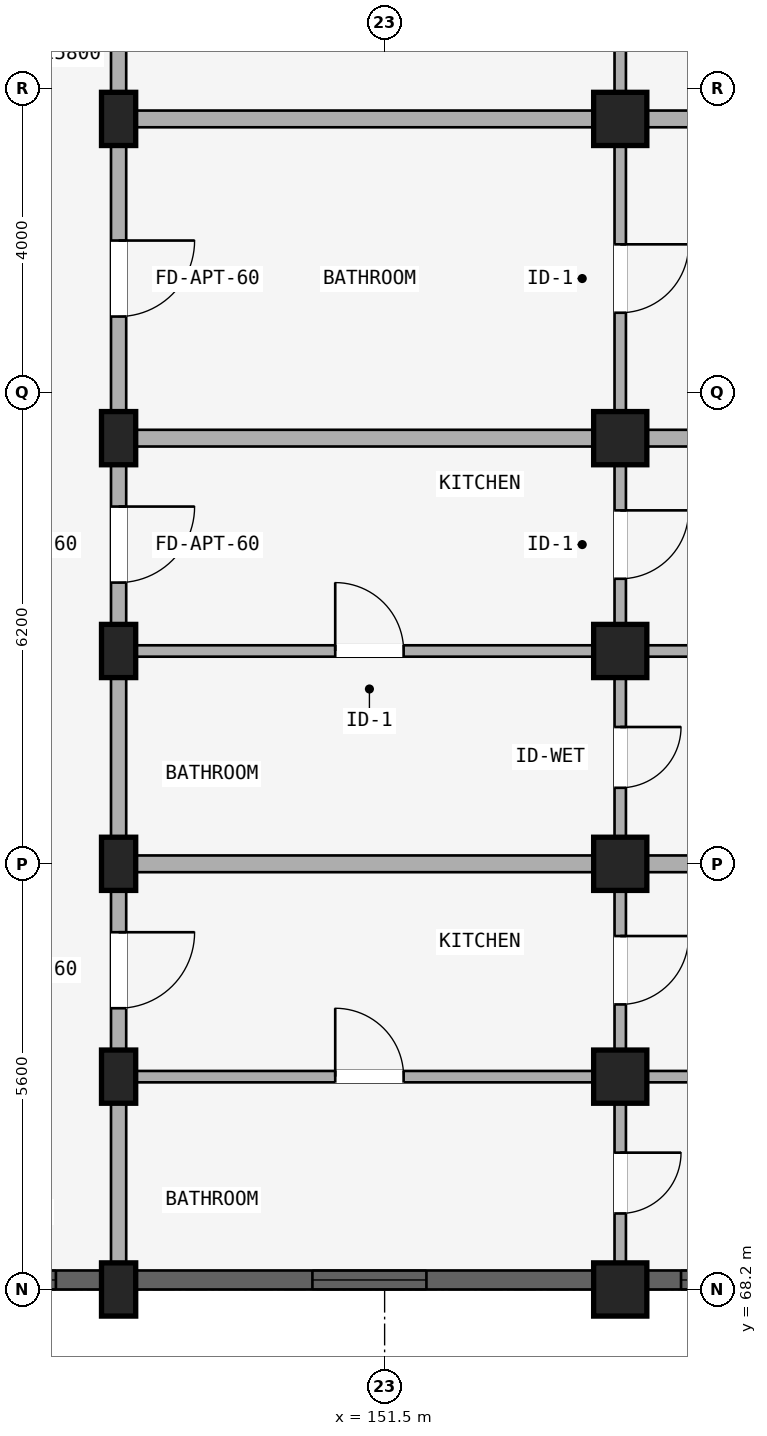
"""IFC4 building model, lengths in metres.
Left out: names, types, materials, properties, quantities, classifications, styles, units other than length and angle.
Written with IfcOpenShell. Run it as: python <this file> out.ifc"""

import sys

from ifc_helpers import new_model, si_unit, direction, frame, frame_2d, origin, origin_2d, place, context, subcontext, project, spatial, rectangle, extrude, element, fill, save


model = new_model("IFC4")
c1 = context("Model", 3, precision=1e-05, world=origin(), true_north=direction((0.0, 1.0)))
c2 = subcontext(c1, "Body", "Model", "MODEL_VIEW")
j1 = project(units=[si_unit("LENGTHUNIT", "METRE"), si_unit("PLANEANGLEUNIT", "RADIAN")], contexts=[c1])
p1 = place(None, origin())
s1 = spatial("IfcSite", under=j1, at=p1, CompositionType="ELEMENT")
p2 = place(p1, origin())
s2 = spatial("IfcBuilding", under=s1, at=p2, CompositionType="ELEMENT")
p3 = place(p2, frame((0.0, 0.0, 18.15)))
s3 = spatial("IfcBuildingStorey", under=s2, at=p3, CompositionType="ELEMENT", Elevation=18.15)
p4 = place(p3, frame((148.0, 83.6, 0.0), z_axis=(0.0, 0.0, 1.0), x_axis=(1.0, 0.0, 0.0)))
e1 = element("IfcColumn", 1, at=p4, inside=s3, PredefinedType="COLUMN", context=c2, shape_type="SweptSolid", body=[
    extrude(rectangle(XDim=0.45, YDim=0.7, at=origin_2d()), origin(), (0.0, 0.0, 1.0), 2.93),
])
p5 = place(p3, frame((154.6, 83.6, 0.0), z_axis=(0.0, 0.0, 1.0), x_axis=(1.0, 0.0, 0.0)))
e2 = element("IfcColumn", 2, at=p5, inside=s3, PredefinedType="COLUMN", context=c2, shape_type="SweptSolid", body=[
    extrude(rectangle(XDim=0.7, YDim=0.7, at=origin_2d()), origin(), (0.0, 0.0, 1.0), 2.93),
])
p6 = place(p3, frame((148.0, 79.4, 0.0), z_axis=(0.0, 0.0, 1.0), x_axis=(1.0, 0.0, 0.0)))
e3 = element("IfcColumn", 3, at=p6, inside=s3, PredefinedType="COLUMN", context=c2, shape_type="SweptSolid", body=[
    extrude(rectangle(XDim=0.45, YDim=0.7, at=origin_2d()), origin(), (0.0, 0.0, 1.0), 2.93),
])
p7 = place(p3, frame((154.6, 79.4, 0.0), z_axis=(0.0, 0.0, 1.0), x_axis=(1.0, 0.0, 0.0)))
e4 = element("IfcColumn", 4, at=p7, inside=s3, PredefinedType="COLUMN", context=c2, shape_type="SweptSolid", body=[
    extrude(rectangle(XDim=0.7, YDim=0.7, at=origin_2d()), origin(), (0.0, 0.0, 1.0), 2.93),
])
p8 = place(p3, frame((148.0, 76.6, 0.0), z_axis=(0.0, 0.0, 1.0), x_axis=(1.0, 0.0, 0.0)))
e5 = element("IfcColumn", 5, at=p8, inside=s3, PredefinedType="COLUMN", context=c2, shape_type="SweptSolid", body=[
    extrude(rectangle(XDim=0.45, YDim=0.7, at=origin_2d()), origin(), (0.0, 0.0, 1.0), 2.93),
])
p9 = place(p3, frame((154.6, 76.6, 0.0), z_axis=(0.0, 0.0, 1.0), x_axis=(1.0, 0.0, 0.0)))
e6 = element("IfcColumn", 6, at=p9, inside=s3, PredefinedType="COLUMN", context=c2, shape_type="SweptSolid", body=[
    extrude(rectangle(XDim=0.7, YDim=0.7, at=origin_2d()), origin(), (0.0, 0.0, 1.0), 2.93),
])
p10 = place(p3, frame((148.0, 73.8, 0.0), z_axis=(0.0, 0.0, 1.0), x_axis=(1.0, 0.0, 0.0)))
e7 = element("IfcColumn", 7, at=p10, inside=s3, PredefinedType="COLUMN", context=c2, shape_type="SweptSolid", body=[
    extrude(rectangle(XDim=0.45, YDim=0.7, at=origin_2d()), origin(), (0.0, 0.0, 1.0), 2.93),
])
p11 = place(p3, frame((154.6, 73.8, 0.0), z_axis=(0.0, 0.0, 1.0), x_axis=(1.0, 0.0, 0.0)))
e8 = element("IfcColumn", 8, at=p11, inside=s3, PredefinedType="COLUMN", context=c2, shape_type="SweptSolid", body=[
    extrude(rectangle(XDim=0.7, YDim=0.7, at=origin_2d()), origin(), (0.0, 0.0, 1.0), 2.93),
])
p12 = place(p3, frame((148.0, 71.0, 0.0), z_axis=(0.0, 0.0, 1.0), x_axis=(1.0, 0.0, 0.0)))
e9 = element("IfcColumn", 9, at=p12, inside=s3, PredefinedType="COLUMN", context=c2, shape_type="SweptSolid", body=[
    extrude(rectangle(XDim=0.45, YDim=0.7, at=origin_2d()), origin(), (0.0, 0.0, 1.0), 2.93),
])
p13 = place(p3, frame((154.6, 71.0, 0.0), z_axis=(0.0, 0.0, 1.0), x_axis=(1.0, 0.0, 0.0)))
e10 = element("IfcColumn", 10, at=p13, inside=s3, PredefinedType="COLUMN", context=c2, shape_type="SweptSolid", body=[
    extrude(rectangle(XDim=0.7, YDim=0.7, at=origin_2d()), origin(), (0.0, 0.0, 1.0), 2.93),
])
p14 = place(p3, frame((148.0, 68.2, 0.0), z_axis=(0.0, 0.0, 1.0), x_axis=(1.0, 0.0, 0.0)))
e11 = element("IfcColumn", 11, at=p14, inside=s3, PredefinedType="COLUMN", context=c2, shape_type="SweptSolid", body=[
    extrude(rectangle(XDim=0.45, YDim=0.7, at=origin_2d()), origin(), (0.0, 0.0, 1.0), 2.93),
])
p15 = place(p3, frame((154.6, 68.2, 0.0), z_axis=(0.0, 0.0, 1.0), x_axis=(1.0, 0.0, 0.0)))
e12 = element("IfcColumn", 12, at=p15, inside=s3, PredefinedType="COLUMN", context=c2, shape_type="SweptSolid", body=[
    extrude(rectangle(XDim=0.7, YDim=0.7, at=origin_2d()), origin(), (0.0, 0.0, 1.0), 2.93),
])
p16 = place(p3, frame((148.0, 87.65, 0.0), z_axis=(0.0, 0.0, 1.0), x_axis=(0.0, -1.0, 0.0)))
e13 = element("IfcWall", 13, at=p16, inside=s3, PredefinedType="STANDARD", context=c2, shape_type="SweptSolid", body=[
    extrude(rectangle(XDim=4.05, YDim=0.2, at=frame_2d((2.025, 0.0))), origin(), (0.0, 0.0, 1.0), 2.372),
])
p17 = place(p16, frame((1.525, 0.0, 0.0)))
e14 = element("IfcOpeningElement", 14, at=p17, cuts=e13, PredefinedType="OPENING", context=c2, shape_type="SweptSolid", body=[
    extrude(rectangle(XDim=1.0, YDim=2.15, at=frame_2d((0.5, 1.075))), frame((0.0, 0.11, 0.0), z_axis=(0.0, -1.0, 0.0), x_axis=(1.0, 0.0, 0.0)), (0.0, 0.0, 1.0), 0.22),
])
p18 = place(p3, frame((154.6, 87.57, 0.0), z_axis=(0.0, 0.0, 1.0), x_axis=(0.0, -1.0, 0.0)))
e15 = element("IfcWall", 15, at=p18, inside=s3, PredefinedType="PARTITIONING", context=c2, shape_type="SweptSolid", body=[
    extrude(rectangle(XDim=3.89, YDim=0.15, at=frame_2d((1.945, 0.0))), origin(), (0.0, 0.0, 1.0), 2.372),
])
p19 = place(p18, frame((1.495, 0.0, 0.0)))
e16 = element("IfcOpeningElement", 16, at=p19, cuts=e15, PredefinedType="OPENING", context=c2, shape_type="SweptSolid", body=[
    extrude(rectangle(XDim=0.9, YDim=2.1, at=frame_2d((0.45, 1.05))), frame((0.0, 0.085, 0.0), z_axis=(0.0, -1.0, 0.0), x_axis=(1.0, 0.0, 0.0)), (0.0, 0.0, 1.0), 0.17),
])
p20 = place(p3, frame((148.0, 83.6, 0.0), z_axis=(0.0, 0.0, 1.0), x_axis=(0.0, -1.0, 0.0)))
e17 = element("IfcWall", 17, at=p20, inside=s3, PredefinedType="STANDARD", context=c2, shape_type="SweptSolid", body=[
    extrude(rectangle(XDim=4.2, YDim=0.2, at=frame_2d((2.1, 0.0))), origin(), (0.0, 0.0, 1.0), 2.372),
])
p21 = place(p20, frame((1.6, 0.0, 0.0)))
e18 = element("IfcOpeningElement", 18, at=p21, cuts=e17, PredefinedType="OPENING", context=c2, shape_type="SweptSolid", body=[
    extrude(rectangle(XDim=1.0, YDim=2.15, at=frame_2d((0.5, 1.075))), frame((0.0, 0.11, 0.0), z_axis=(0.0, -1.0, 0.0), x_axis=(1.0, 0.0, 0.0)), (0.0, 0.0, 1.0), 0.22),
])
p22 = place(p3, frame((154.6, 83.52, 0.0), z_axis=(0.0, 0.0, 1.0), x_axis=(0.0, -1.0, 0.0)))
e19 = element("IfcWall", 19, at=p22, inside=s3, PredefinedType="PARTITIONING", context=c2, shape_type="SweptSolid", body=[
    extrude(rectangle(XDim=4.04, YDim=0.15, at=frame_2d((2.02, 0.0))), origin(), (0.0, 0.0, 1.0), 2.372),
])
p23 = place(p22, frame((1.57, 0.0, 0.0)))
e20 = element("IfcOpeningElement", 20, at=p23, cuts=e19, PredefinedType="OPENING", context=c2, shape_type="SweptSolid", body=[
    extrude(rectangle(XDim=0.9, YDim=2.1, at=frame_2d((0.45, 1.05))), frame((0.0, 0.085, 0.0), z_axis=(0.0, -1.0, 0.0), x_axis=(1.0, 0.0, 0.0)), (0.0, 0.0, 1.0), 0.17),
])
p24 = place(p3, frame((148.05, 83.6, 0.0), z_axis=(0.0, 0.0, 1.0), x_axis=(1.0, 0.0, 0.0)))
e21 = element("IfcWall", 21, at=p24, inside=s3, PredefinedType="STANDARD", context=c2, shape_type="SweptSolid", body=[
    extrude(rectangle(XDim=17.53, YDim=0.22, at=frame_2d((8.765, 0.0))), origin(), (0.0, 0.0, 1.0), 2.372),
])
p25 = place(p3, frame((148.0, 79.4, 0.0), z_axis=(0.0, 0.0, 1.0), x_axis=(0.0, -1.0, 0.0)))
e22 = element("IfcWall", 22, at=p25, inside=s3, PredefinedType="STANDARD", context=c2, shape_type="SweptSolid", body=[
    extrude(rectangle(XDim=2.8, YDim=0.2, at=frame_2d((1.4, 0.0))), origin(), (0.0, 0.0, 1.0), 2.372),
])
p26 = place(p25, frame((0.9, 0.0, 0.0)))
e23 = element("IfcOpeningElement", 23, at=p26, cuts=e22, PredefinedType="OPENING", context=c2, shape_type="SweptSolid", body=[
    extrude(rectangle(XDim=1.0, YDim=2.15, at=frame_2d((0.5, 1.075))), frame((0.0, 0.11, 0.0), z_axis=(0.0, -1.0, 0.0), x_axis=(1.0, 0.0, 0.0)), (0.0, 0.0, 1.0), 0.22),
])
p27 = place(p3, frame((154.6, 79.32, 0.0), z_axis=(0.0, 0.0, 1.0), x_axis=(0.0, -1.0, 0.0)))
e24 = element("IfcWall", 24, at=p27, inside=s3, PredefinedType="PLUMBINGWALL", context=c2, shape_type="SweptSolid", body=[
    extrude(rectangle(XDim=2.64, YDim=0.15, at=frame_2d((1.32, 0.0))), origin(), (0.0, 0.0, 1.0), 2.372),
])
p28 = place(p27, frame((0.87, 0.0, 0.0)))
e25 = element("IfcOpeningElement", 25, at=p28, cuts=e24, PredefinedType="OPENING", context=c2, shape_type="SweptSolid", body=[
    extrude(rectangle(XDim=0.9, YDim=2.1, at=frame_2d((0.45, 1.05))), frame((0.0, 0.085, 0.0), z_axis=(0.0, -1.0, 0.0), x_axis=(1.0, 0.0, 0.0)), (0.0, 0.0, 1.0), 0.17),
])
p29 = place(p3, frame((148.1, 79.4, 0.0), z_axis=(0.0, 0.0, 1.0), x_axis=(1.0, 0.0, 0.0)))
e26 = element("IfcWall", 26, at=p29, inside=s3, PredefinedType="STANDARD", context=c2, shape_type="SweptSolid", body=[
    extrude(rectangle(XDim=17.42, YDim=0.22, at=frame_2d((8.71, 0.0))), origin(), (0.0, 0.0, 1.0), 2.372),
])
p30 = place(p3, frame((148.0, 76.6, 0.0), z_axis=(0.0, 0.0, 1.0), x_axis=(0.0, -1.0, 0.0)))
e27 = element("IfcWall", 27, at=p30, inside=s3, PredefinedType="STANDARD", context=c2, shape_type="SweptSolid", body=[
    extrude(rectangle(XDim=2.8, YDim=0.2, at=frame_2d((1.4, 0.0))), origin(), (0.0, 0.0, 1.0), 2.372),
])
p31 = place(p3, frame((154.6, 76.52, 0.0), z_axis=(0.0, 0.0, 1.0), x_axis=(0.0, -1.0, 0.0)))
e28 = element("IfcWall", 28, at=p31, inside=s3, PredefinedType="PLUMBINGWALL", context=c2, shape_type="SweptSolid", body=[
    extrude(rectangle(XDim=2.64, YDim=0.15, at=frame_2d((1.32, 0.0))), origin(), (0.0, 0.0, 1.0), 2.372),
])
p32 = place(p31, frame((0.92, 0.0, 0.0)))
e29 = element("IfcOpeningElement", 29, at=p32, cuts=e28, PredefinedType="OPENING", context=c2, shape_type="SweptSolid", body=[
    extrude(rectangle(XDim=0.8, YDim=2.1, at=frame_2d((0.4, 1.05))), frame((0.0, 0.085, 0.0), z_axis=(0.0, -1.0, 0.0), x_axis=(1.0, 0.0, 0.0)), (0.0, 0.0, 1.0), 0.17),
])
p33 = place(p3, frame((148.1, 76.6, 0.0), z_axis=(0.0, 0.0, 1.0), x_axis=(1.0, 0.0, 0.0)))
e30 = element("IfcWall", 30, at=p33, inside=s3, PredefinedType="PARTITIONING", context=c2, shape_type="SweptSolid", body=[
    extrude(rectangle(XDim=17.42, YDim=0.15, at=frame_2d((8.71, 0.0))), origin(), (0.0, 0.0, 1.0), 2.372),
])
p34 = place(p33, frame((2.75, 0.0, 0.0)))
e31 = element("IfcOpeningElement", 31, at=p34, cuts=e30, PredefinedType="OPENING", context=c2, shape_type="SweptSolid", body=[
    extrude(rectangle(XDim=0.9, YDim=2.1, at=frame_2d((0.45, 1.05))), frame((0.0, 0.085, 0.0), z_axis=(0.0, -1.0, 0.0), x_axis=(1.0, 0.0, 0.0)), (0.0, 0.0, 1.0), 0.17),
])
p35 = place(p3, frame((148.0, 73.8, 0.0), z_axis=(0.0, 0.0, 1.0), x_axis=(0.0, -1.0, 0.0)))
e32 = element("IfcWall", 32, at=p35, inside=s3, PredefinedType="STANDARD", context=c2, shape_type="SweptSolid", body=[
    extrude(rectangle(XDim=2.8, YDim=0.2, at=frame_2d((1.4, 0.0))), origin(), (0.0, 0.0, 1.0), 2.372),
])
p36 = place(p35, frame((0.9, 0.0, 0.0)))
e33 = element("IfcOpeningElement", 33, at=p36, cuts=e32, PredefinedType="OPENING", context=c2, shape_type="SweptSolid", body=[
    extrude(rectangle(XDim=1.0, YDim=2.15, at=frame_2d((0.5, 1.075))), frame((0.0, 0.11, 0.0), z_axis=(0.0, -1.0, 0.0), x_axis=(1.0, 0.0, 0.0)), (0.0, 0.0, 1.0), 0.22),
])
p37 = place(p3, frame((154.6, 73.72, 0.0), z_axis=(0.0, 0.0, 1.0), x_axis=(0.0, -1.0, 0.0)))
e34 = element("IfcWall", 34, at=p37, inside=s3, PredefinedType="PLUMBINGWALL", context=c2, shape_type="SweptSolid", body=[
    extrude(rectangle(XDim=2.64, YDim=0.15, at=frame_2d((1.32, 0.0))), origin(), (0.0, 0.0, 1.0), 2.372),
])
p38 = place(p37, frame((0.87, 0.0, 0.0)))
e35 = element("IfcOpeningElement", 35, at=p38, cuts=e34, PredefinedType="OPENING", context=c2, shape_type="SweptSolid", body=[
    extrude(rectangle(XDim=0.9, YDim=2.1, at=frame_2d((0.45, 1.05))), frame((0.0, 0.085, 0.0), z_axis=(0.0, -1.0, 0.0), x_axis=(1.0, 0.0, 0.0)), (0.0, 0.0, 1.0), 0.17),
])
p39 = place(p3, frame((148.1, 73.8, 0.0), z_axis=(0.0, 0.0, 1.0), x_axis=(1.0, 0.0, 0.0)))
e36 = element("IfcWall", 36, at=p39, inside=s3, PredefinedType="STANDARD", context=c2, shape_type="SweptSolid", body=[
    extrude(rectangle(XDim=17.42, YDim=0.22, at=frame_2d((8.71, 0.0))), origin(), (0.0, 0.0, 1.0), 2.372),
])
p40 = place(p3, frame((148.0, 71.0, 0.0), z_axis=(0.0, 0.0, 1.0), x_axis=(0.0, -1.0, 0.0)))
e37 = element("IfcWall", 37, at=p40, inside=s3, PredefinedType="STANDARD", context=c2, shape_type="SweptSolid", body=[
    extrude(rectangle(XDim=2.8, YDim=0.2, at=frame_2d((1.4, 0.0))), origin(), (0.0, 0.0, 1.0), 2.372),
])
p41 = place(p3, frame((154.6, 70.92, 0.0), z_axis=(0.0, 0.0, 1.0), x_axis=(0.0, -1.0, 0.0)))
e38 = element("IfcWall", 38, at=p41, inside=s3, PredefinedType="PLUMBINGWALL", context=c2, shape_type="SweptSolid", body=[
    extrude(rectangle(XDim=2.64, YDim=0.15, at=frame_2d((1.32, 0.0))), origin(), (0.0, 0.0, 1.0), 2.372),
])
p42 = place(p41, frame((0.92, 0.0, 0.0)))
e39 = element("IfcOpeningElement", 39, at=p42, cuts=e38, PredefinedType="OPENING", context=c2, shape_type="SweptSolid", body=[
    extrude(rectangle(XDim=0.8, YDim=2.1, at=frame_2d((0.4, 1.05))), frame((0.0, 0.085, 0.0), z_axis=(0.0, -1.0, 0.0), x_axis=(1.0, 0.0, 0.0)), (0.0, 0.0, 1.0), 0.17),
])
p43 = place(p3, frame((148.1, 71.0, 0.0), z_axis=(0.0, 0.0, 1.0), x_axis=(1.0, 0.0, 0.0)))
e40 = element("IfcWall", 40, at=p43, inside=s3, PredefinedType="PARTITIONING", context=c2, shape_type="SweptSolid", body=[
    extrude(rectangle(XDim=17.42, YDim=0.15, at=frame_2d((8.71, 0.0))), origin(), (0.0, 0.0, 1.0), 2.372),
])
p44 = place(p43, frame((2.75, 0.0, 0.0)))
e41 = element("IfcOpeningElement", 41, at=p44, cuts=e40, PredefinedType="OPENING", context=c2, shape_type="SweptSolid", body=[
    extrude(rectangle(XDim=0.9, YDim=2.1, at=frame_2d((0.45, 1.05))), frame((0.0, 0.085, 0.0), z_axis=(0.0, -1.0, 0.0), x_axis=(1.0, 0.0, 0.0)), (0.0, 0.0, 1.0), 0.17),
])
p45 = place(p3, frame((145.829, 68.325, 0.0), z_axis=(0.0, 0.0, 1.0), x_axis=(1.0, 0.0, 0.0)))
e42 = element("IfcWall", 42, at=p45, inside=s3, PredefinedType="STANDARD", context=c2, shape_type="SweptSolid", body=[
    extrude(rectangle(XDim=1.943, YDim=0.25, at=frame_2d((0.971, 0.0))), origin(), (0.0, 0.0, 1.0), 2.372),
])
p46 = place(p45, frame((0.596, 0.0, 0.88)))
e43 = element("IfcOpeningElement", 43, at=p46, cuts=e42, PredefinedType="OPENING", context=c2, shape_type="SweptSolid", body=[
    extrude(rectangle(XDim=0.75, YDim=1.05, at=frame_2d((0.375, 0.525))), frame((0.0, 0.135, 0.0), z_axis=(0.0, -1.0, 0.0), x_axis=(1.0, 0.0, 0.0)), (0.0, 0.0, 1.0), 0.27),
])
p47 = place(p3, frame((148.229, 68.325, 0.0), z_axis=(0.0, 0.0, 1.0), x_axis=(1.0, 0.0, 0.0)))
e44 = element("IfcWall", 44, at=p47, inside=s3, PredefinedType="STANDARD", context=c2, shape_type="SweptSolid", body=[
    extrude(rectangle(XDim=6.018, YDim=0.25, at=frame_2d((3.009, 0.0))), origin(), (0.0, 0.0, 1.0), 2.372),
])
p48 = place(p47, frame((2.322, 0.0, 0.522)))
e45 = element("IfcOpeningElement", 45, at=p48, cuts=e44, PredefinedType="OPENING", context=c2, shape_type="SweptSolid", body=[
    extrude(rectangle(XDim=1.5, YDim=1.65, at=frame_2d((0.75, 0.825))), frame((0.0, 0.135, 0.0), z_axis=(0.0, -1.0, 0.0), x_axis=(1.0, 0.0, 0.0)), (0.0, 0.0, 1.0), 0.27),
])
p49 = place(p3, frame((154.954, 68.325, 0.0), z_axis=(0.0, 0.0, 1.0), x_axis=(1.0, 0.0, 0.0)))
e46 = element("IfcWall", 46, at=p49, inside=s3, PredefinedType="STANDARD", context=c2, shape_type="SweptSolid", body=[
    extrude(rectangle(XDim=2.093, YDim=0.25, at=frame_2d((1.046, 0.0))), origin(), (0.0, 0.0, 1.0), 2.372),
])
p50 = place(p49, frame((0.447, 0.0, 0.672)))
e47 = element("IfcOpeningElement", 47, at=p50, cuts=e46, PredefinedType="OPENING", context=c2, shape_type="SweptSolid", body=[
    extrude(rectangle(XDim=1.2, YDim=1.5, at=frame_2d((0.6, 0.75))), frame((0.0, 0.135, 0.0), z_axis=(0.0, -1.0, 0.0), x_axis=(1.0, 0.0, 0.0)), (0.0, 0.0, 1.0), 0.27),
])
p51 = place(p46, origin())
e48 = element("IfcWindow", 48, at=p51, inside=s3, PartitioningType="SINGLE_PANEL", PredefinedType="WINDOW", context=c2, shape_type="SweptSolid", body=[
    extrude(rectangle(XDim=0.75, YDim=1.05, at=frame_2d((0.375, 0.525))), frame((0.0, 0.03, 0.0), z_axis=(0.0, -1.0, 0.0), x_axis=(1.0, 0.0, 0.0)), (0.0, 0.0, 1.0), 0.06),
])
fill(e43, e48)
p52 = place(p48, origin())
e49 = element("IfcWindow", 49, at=p52, inside=s3, PartitioningType="DOUBLE_PANEL_VERTICAL", PredefinedType="WINDOW", context=c2, shape_type="SweptSolid", body=[
    extrude(rectangle(XDim=1.5, YDim=1.65, at=frame_2d((0.75, 0.825))), frame((0.0, 0.03, 0.0), z_axis=(0.0, -1.0, 0.0), x_axis=(1.0, 0.0, 0.0)), (0.0, 0.0, 1.0), 0.06),
])
fill(e45, e49)
p53 = place(p50, origin())
e50 = element("IfcWindow", 50, at=p53, inside=s3, PartitioningType="SINGLE_PANEL", PredefinedType="WINDOW", context=c2, shape_type="SweptSolid", body=[
    extrude(rectangle(XDim=1.2, YDim=1.5, at=frame_2d((0.6, 0.75))), frame((0.0, 0.03, 0.0), z_axis=(0.0, -1.0, 0.0), x_axis=(1.0, 0.0, 0.0)), (0.0, 0.0, 1.0), 0.06),
])
fill(e47, e50)
p54 = place(p21, frame((1.0, 0.0, 0.0), z_axis=(0.0, 0.0, 1.0), x_axis=(-1.0, 0.0, 0.0)))
e51 = element("IfcDoor", 51, at=p54, inside=s3, OperationType="SINGLE_SWING_RIGHT", PredefinedType="DOOR", context=c2, shape_type="SweptSolid", body=[
    extrude(rectangle(XDim=1.0, YDim=2.15, at=frame_2d((0.5, 1.075))), frame((0.0, 0.025, 0.0), z_axis=(0.0, -1.0, 0.0), x_axis=(1.0, 0.0, 0.0)), (0.0, 0.0, 1.0), 0.05),
])
fill(e18, e51)
p55 = place(p23, origin())
e52 = element("IfcDoor", 52, at=p55, inside=s3, OperationType="SINGLE_SWING_LEFT", PredefinedType="DOOR", context=c2, shape_type="SweptSolid", body=[
    extrude(rectangle(XDim=0.9, YDim=2.1, at=frame_2d((0.45, 1.05))), frame((0.0, 0.025, 0.0), z_axis=(0.0, -1.0, 0.0), x_axis=(1.0, 0.0, 0.0)), (0.0, 0.0, 1.0), 0.05),
])
fill(e20, e52)
p56 = place(p28, origin())
e53 = element("IfcDoor", 53, at=p56, inside=s3, OperationType="SINGLE_SWING_LEFT", PredefinedType="DOOR", context=c2, shape_type="SweptSolid", body=[
    extrude(rectangle(XDim=0.9, YDim=2.1, at=frame_2d((0.45, 1.05))), frame((0.0, 0.025, 0.0), z_axis=(0.0, -1.0, 0.0), x_axis=(1.0, 0.0, 0.0)), (0.0, 0.0, 1.0), 0.05),
])
fill(e25, e53)
p57 = place(p26, frame((1.0, 0.0, 0.0), z_axis=(0.0, 0.0, 1.0), x_axis=(-1.0, 0.0, 0.0)))
e54 = element("IfcDoor", 54, at=p57, inside=s3, OperationType="SINGLE_SWING_RIGHT", PredefinedType="DOOR", context=c2, shape_type="SweptSolid", body=[
    extrude(rectangle(XDim=1.0, YDim=2.15, at=frame_2d((0.5, 1.075))), frame((0.0, 0.025, 0.0), z_axis=(0.0, -1.0, 0.0), x_axis=(1.0, 0.0, 0.0)), (0.0, 0.0, 1.0), 0.05),
])
fill(e23, e54)
p58 = place(p32, origin())
e55 = element("IfcDoor", 55, at=p58, inside=s3, OperationType="SINGLE_SWING_LEFT", PredefinedType="DOOR", context=c2, shape_type="SweptSolid", body=[
    extrude(rectangle(XDim=0.8, YDim=2.1, at=frame_2d((0.4, 1.05))), frame((0.0, 0.025, 0.0), z_axis=(0.0, -1.0, 0.0), x_axis=(1.0, 0.0, 0.0)), (0.0, 0.0, 1.0), 0.05),
])
fill(e29, e55)
p59 = place(p34, origin())
e56 = element("IfcDoor", 56, at=p59, inside=s3, OperationType="SINGLE_SWING_LEFT", PredefinedType="DOOR", context=c2, shape_type="SweptSolid", body=[
    extrude(rectangle(XDim=0.9, YDim=2.1, at=frame_2d((0.45, 1.05))), frame((0.0, 0.025, 0.0), z_axis=(0.0, -1.0, 0.0), x_axis=(1.0, 0.0, 0.0)), (0.0, 0.0, 1.0), 0.05),
])
fill(e31, e56)
p60 = place(p38, origin())
e57 = element("IfcDoor", 57, at=p60, inside=s3, OperationType="SINGLE_SWING_LEFT", PredefinedType="DOOR", context=c2, shape_type="SweptSolid", body=[
    extrude(rectangle(XDim=0.9, YDim=2.1, at=frame_2d((0.45, 1.05))), frame((0.0, 0.025, 0.0), z_axis=(0.0, -1.0, 0.0), x_axis=(1.0, 0.0, 0.0)), (0.0, 0.0, 1.0), 0.05),
])
fill(e35, e57)
p61 = place(p36, frame((1.0, 0.0, 0.0), z_axis=(0.0, 0.0, 1.0), x_axis=(-1.0, 0.0, 0.0)))
e58 = element("IfcDoor", 58, at=p61, inside=s3, OperationType="SINGLE_SWING_RIGHT", PredefinedType="DOOR", context=c2, shape_type="SweptSolid", body=[
    extrude(rectangle(XDim=1.0, YDim=2.15, at=frame_2d((0.5, 1.075))), frame((0.0, 0.025, 0.0), z_axis=(0.0, -1.0, 0.0), x_axis=(1.0, 0.0, 0.0)), (0.0, 0.0, 1.0), 0.05),
])
fill(e33, e58)
p62 = place(p42, origin())
e59 = element("IfcDoor", 59, at=p62, inside=s3, OperationType="SINGLE_SWING_LEFT", PredefinedType="DOOR", context=c2, shape_type="SweptSolid", body=[
    extrude(rectangle(XDim=0.8, YDim=2.1, at=frame_2d((0.4, 1.05))), frame((0.0, 0.025, 0.0), z_axis=(0.0, -1.0, 0.0), x_axis=(1.0, 0.0, 0.0)), (0.0, 0.0, 1.0), 0.05),
])
fill(e39, e59)
p63 = place(p44, origin())
e60 = element("IfcDoor", 60, at=p63, inside=s3, OperationType="SINGLE_SWING_LEFT", PredefinedType="DOOR", context=c2, shape_type="SweptSolid", body=[
    extrude(rectangle(XDim=0.9, YDim=2.1, at=frame_2d((0.45, 1.05))), frame((0.0, 0.025, 0.0), z_axis=(0.0, -1.0, 0.0), x_axis=(1.0, 0.0, 0.0)), (0.0, 0.0, 1.0), 0.05),
])
fill(e41, e60)
save(model, sys.argv[1])
